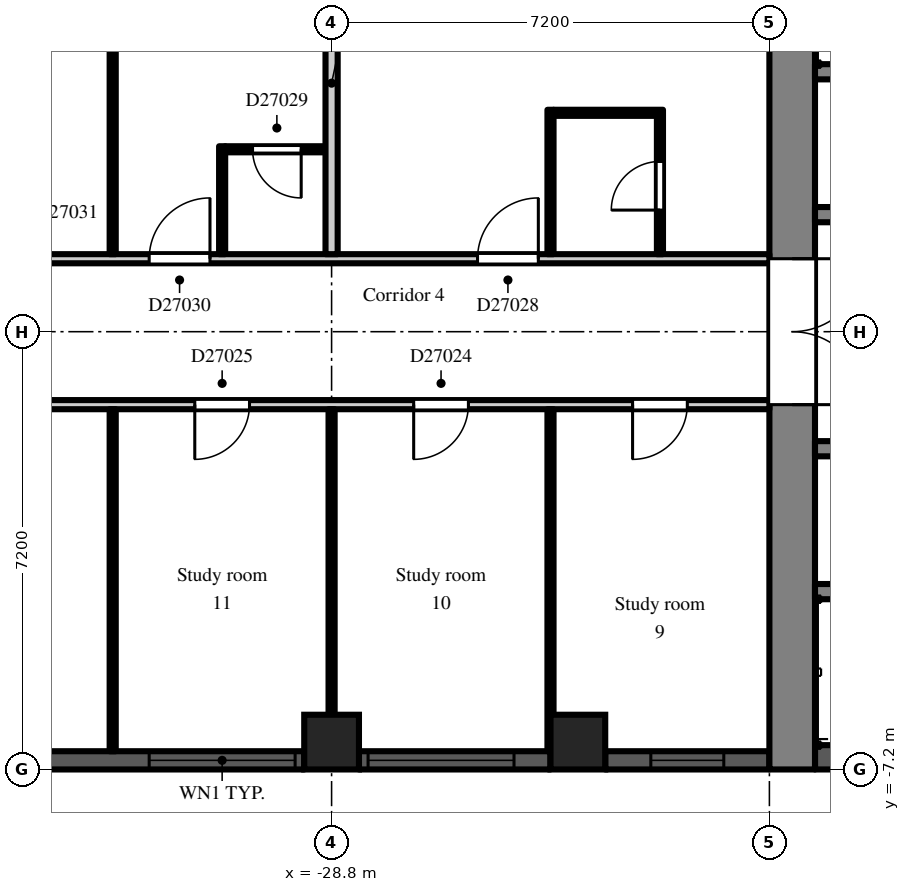
"""IFC4 building model, lengths in metres.
Left out: names, types, materials, properties, quantities, classifications, styles, units other than length and angle.
Written with IfcOpenShell. Run it as: python <this file> out.ifc"""

import sys

from ifc_helpers import new_model, si_unit, direction, frame, frame_2d, origin, origin_2d, place, context, subcontext, project, spatial, rectangle, extrude, element, fill, save


model = new_model("IFC4")
c1 = context("Model", 3, precision=1e-05, world=origin(), true_north=direction((0.0, 1.0)))
c2 = subcontext(c1, "Body", "Model", "MODEL_VIEW")
j1 = project(units=[si_unit("LENGTHUNIT", "METRE"), si_unit("PLANEANGLEUNIT", "RADIAN")], contexts=[c1])
p1 = place(None, origin())
s1 = spatial("IfcSite", under=j1, at=p1, CompositionType="ELEMENT")
p2 = place(p1, origin())
s2 = spatial("IfcBuilding", under=s1, at=p2, CompositionType="ELEMENT")
p3 = place(p2, frame((0.0, 0.0, 188.7)))
s3 = spatial("IfcBuildingStorey", under=s2, at=p3, CompositionType="ELEMENT", Elevation=188.7)
for number, where, z_axis, x_axis in (
    (1, (-28.8, -6.75, 0.0), (0.0, 0.0, 1.0), (1.0, 0.0, 0.0)),
    (2, (-24.75, -6.75, 0.0), (0.0, 0.0, 1.0), (1.0, 0.0, 0.0)),
):
    element("IfcColumn", number, at=place(p3, frame(where, z_axis=z_axis, x_axis=x_axis)), inside=s3, PredefinedType="COLUMN", context=c2, shape_type="SweptSolid", body=[
        extrude(rectangle(XDim=0.9, YDim=0.9, at=origin_2d()), origin(), (0.0, 0.0, 1.0), 3.0),
    ])
p4 = place(p3, frame((-35.55, -7.05, 0.0), z_axis=(0.0, 0.0, 1.0), x_axis=(1.0, 0.0, 0.0)))
e3 = element("IfcWall", 3, at=p4, inside=s3, PredefinedType="SOLIDWALL", context=c2, shape_type="SweptSolid", body=[
    extrude(rectangle(XDim=6.3, YDim=0.3, at=frame_2d((3.15, 0.0))), origin(), (0.0, 0.0, 1.0), 2.2),
])
p5 = place(p4, frame((3.75, 0.0, 0.2)))
e4 = element("IfcOpeningElement", 4, at=p5, cuts=e3, PredefinedType="OPENING", context=c2, shape_type="SweptSolid", body=[
    extrude(rectangle(XDim=2.4, YDim=1.85, at=frame_2d((1.2, 0.925))), frame((0.0, 0.16, 0.0), z_axis=(0.0, -1.0, 0.0), x_axis=(1.0, 0.0, 0.0)), (0.0, 0.0, 1.0), 0.32),
])
p6 = place(p3, frame((-28.35, -7.05, 0.0), z_axis=(0.0, 0.0, 1.0), x_axis=(1.0, 0.0, 0.0)))
e5 = element("IfcWall", 5, at=p6, inside=s3, PredefinedType="SOLIDWALL", context=c2, shape_type="SweptSolid", body=[
    extrude(rectangle(XDim=3.15, YDim=0.3, at=frame_2d((1.575, 0.0))), origin(), (0.0, 0.0, 1.0), 2.2),
])
p7 = place(p6, frame((0.15, 0.0, 0.2)))
e6 = element("IfcOpeningElement", 6, at=p7, cuts=e5, PredefinedType="OPENING", context=c2, shape_type="SweptSolid", body=[
    extrude(rectangle(XDim=2.4, YDim=1.85, at=frame_2d((1.2, 0.925))), frame((0.0, 0.16, 0.0), z_axis=(0.0, -1.0, 0.0), x_axis=(1.0, 0.0, 0.0)), (0.0, 0.0, 1.0), 0.32),
])
p8 = place(p3, frame((-24.3, -7.05, 0.0), z_axis=(0.0, 0.0, 1.0), x_axis=(1.0, 0.0, 0.0)))
e7 = element("IfcWall", 7, at=p8, inside=s3, PredefinedType="SOLIDWALL", context=c2, shape_type="SweptSolid", body=[
    extrude(rectangle(XDim=2.7, YDim=0.3, at=frame_2d((1.35, 0.0))), origin(), (0.0, 0.0, 1.0), 2.2),
])
p9 = place(p8, frame((0.75, 0.0, 0.2)))
e8 = element("IfcOpeningElement", 8, at=p9, cuts=e7, PredefinedType="OPENING", context=c2, shape_type="SweptSolid", body=[
    extrude(rectangle(XDim=1.2, YDim=1.85, at=frame_2d((0.6, 0.925))), frame((0.0, 0.16, 0.0), z_axis=(0.0, -1.0, 0.0), x_axis=(1.0, 0.0, 0.0)), (0.0, 0.0, 1.0), 0.32),
])
p10 = place(p3, frame((-21.225, -7.2, 0.0), z_axis=(0.0, 0.0, 1.0), x_axis=(0.0, 1.0, 0.0)))
e9 = element("IfcWall", 9, at=p10, inside=s3, PredefinedType="SHEAR", context=c2, shape_type="SweptSolid", body=[
    extrude(rectangle(XDim=14.4, YDim=0.75, at=frame_2d((7.2, 0.0))), origin(), (0.0, 0.0, 1.0), 2.6),
])
p11 = place(p10, frame((6.0, 0.0, 0.0)))
e10 = element("IfcOpeningElement", 10, at=p11, cuts=e9, PredefinedType="OPENING", context=c2, shape_type="SweptSolid", body=[
    extrude(rectangle(XDim=2.4, YDim=2.2, at=frame_2d((1.2, 1.1))), frame((0.0, 0.385, 0.0), z_axis=(0.0, -1.0, 0.0), x_axis=(1.0, 0.0, 0.0)), (0.0, 0.0, 1.0), 0.77),
])
p12 = place(p3, frame((-7.9, 1.925, 0.0), z_axis=(0.0, 0.0, 1.0), x_axis=(-1.0, 0.0, 0.0)))
e11 = element("IfcWall", 11, at=p12, inside=s3, PredefinedType="SHEAR", context=c2, shape_type="SweptSolid", body=[
    extrude(rectangle(XDim=12.95, YDim=0.25, at=frame_2d((6.475, 0.0))), origin(), (0.0, 0.0, 1.0), 2.6),
])
p13 = place(p12, frame((4.825, 0.0, 0.0)))
e12 = element("IfcOpeningElement", 12, at=p13, cuts=e11, PredefinedType="OPENING", context=c2, shape_type="SweptSolid", body=[
    extrude(rectangle(XDim=1.1, YDim=2.1, at=frame_2d((0.55, 1.05))), frame((0.0, 0.135, 0.0), z_axis=(0.0, -1.0, 0.0), x_axis=(1.0, 0.0, 0.0)), (0.0, 0.0, 1.0), 0.27),
])
p14 = place(p12, frame((7.025, 0.0, 0.0)))
e13 = element("IfcOpeningElement", 13, at=p14, cuts=e11, PredefinedType="OPENING", context=c2, shape_type="SweptSolid", body=[
    extrude(rectangle(XDim=1.1, YDim=2.1, at=frame_2d((0.55, 1.05))), frame((0.0, 0.135, 0.0), z_axis=(0.0, -1.0, 0.0), x_axis=(1.0, 0.0, 0.0)), (0.0, 0.0, 1.0), 0.27),
])
p15 = place(p12, frame((9.225, 0.0, 0.0)))
e14 = element("IfcOpeningElement", 14, at=p15, cuts=e11, PredefinedType="OPENING", context=c2, shape_type="SweptSolid", body=[
    extrude(rectangle(XDim=1.1, YDim=2.1, at=frame_2d((0.55, 1.05))), frame((0.0, 0.135, 0.0), z_axis=(0.0, -1.0, 0.0), x_axis=(1.0, 0.0, 0.0)), (0.0, 0.0, 1.0), 0.27),
])
p16 = place(p12, frame((0.525, 0.0, 0.0)))
e15 = element("IfcOpeningElement", 15, at=p16, cuts=e11, PredefinedType="OPENING", context=c2, shape_type="SweptSolid", body=[
    extrude(rectangle(XDim=0.9, YDim=2.1, at=frame_2d((0.45, 1.05))), frame((0.0, 0.135, 0.0), z_axis=(0.0, -1.0, 0.0), x_axis=(1.0, 0.0, 0.0)), (0.0, 0.0, 1.0), 0.27),
])
p17 = place(p12, frame((2.625, 0.0, 0.0)))
e16 = element("IfcOpeningElement", 16, at=p17, cuts=e11, PredefinedType="OPENING", context=c2, shape_type="SweptSolid", body=[
    extrude(rectangle(XDim=1.1, YDim=2.1, at=frame_2d((0.55, 1.05))), frame((0.0, 0.135, 0.0), z_axis=(0.0, -1.0, 0.0), x_axis=(1.0, 0.0, 0.0)), (0.0, 0.0, 1.0), 0.27),
])
p18 = place(p12, frame((11.525, 0.0, 0.0)))
e17 = element("IfcOpeningElement", 17, at=p18, cuts=e11, PredefinedType="OPENING", context=c2, shape_type="SweptSolid", body=[
    extrude(rectangle(XDim=0.9, YDim=2.1, at=frame_2d((0.45, 1.05))), frame((0.0, 0.135, 0.0), z_axis=(0.0, -1.0, 0.0), x_axis=(1.0, 0.0, 0.0)), (0.0, 0.0, 1.0), 0.27),
])
p19 = place(p3, frame((-12.3, 4.275, 0.0), z_axis=(0.0, 0.0, 1.0), x_axis=(-1.0, 0.0, 0.0)))
e18 = element("IfcWall", 18, at=p19, inside=s3, PredefinedType="SHEAR", context=c2, shape_type="SweptSolid", body=[
    extrude(rectangle(XDim=8.55, YDim=0.25, at=frame_2d((4.275, 0.0))), origin(), (0.0, 0.0, 1.0), 2.6),
])
p20 = place(p3, frame((-7.9, -7.0, 0.0), z_axis=(0.0, 0.0, 1.0), x_axis=(-1.0, 0.0, 0.0)))
e19 = element("IfcWall", 19, at=p20, inside=s3, PredefinedType="SHEAR", context=c2, shape_type="SweptSolid", body=[
    extrude(rectangle(XDim=12.95, YDim=0.4, at=frame_2d((6.475, 0.0))), origin(), (0.0, 0.0, 1.0), 2.6),
])
p21 = place(p3, frame((-7.9, -1.925, 0.0), z_axis=(0.0, 0.0, 1.0), x_axis=(-1.0, 0.0, 0.0)))
e20 = element("IfcWall", 20, at=p21, inside=s3, PredefinedType="SHEAR", context=c2, shape_type="SweptSolid", body=[
    extrude(rectangle(XDim=12.95, YDim=0.25, at=frame_2d((6.475, 0.0))), origin(), (0.0, 0.0, 1.0), 2.6),
])
p22 = place(p21, frame((0.525, 0.0, 0.0)))
e21 = element("IfcOpeningElement", 21, at=p22, cuts=e20, PredefinedType="OPENING", context=c2, shape_type="SweptSolid", body=[
    extrude(rectangle(XDim=0.9, YDim=2.1, at=frame_2d((0.45, 1.05))), frame((0.0, 0.135, 0.0), z_axis=(0.0, -1.0, 0.0), x_axis=(1.0, 0.0, 0.0)), (0.0, 0.0, 1.0), 0.27),
])
p23 = place(p21, frame((2.625, 0.0, 0.0)))
e22 = element("IfcOpeningElement", 22, at=p23, cuts=e20, PredefinedType="OPENING", context=c2, shape_type="SweptSolid", body=[
    extrude(rectangle(XDim=1.1, YDim=2.1, at=frame_2d((0.55, 1.05))), frame((0.0, 0.135, 0.0), z_axis=(0.0, -1.0, 0.0), x_axis=(1.0, 0.0, 0.0)), (0.0, 0.0, 1.0), 0.27),
])
p24 = place(p21, frame((8.225, 0.0, 0.0)))
e23 = element("IfcOpeningElement", 23, at=p24, cuts=e20, PredefinedType="OPENING", context=c2, shape_type="SweptSolid", body=[
    extrude(rectangle(XDim=0.9, YDim=2.1, at=frame_2d((0.45, 1.05))), frame((0.0, 0.135, 0.0), z_axis=(0.0, -1.0, 0.0), x_axis=(1.0, 0.0, 0.0)), (0.0, 0.0, 1.0), 0.27),
])
p25 = place(p3, frame((-12.3, -4.275, 0.0), z_axis=(0.0, 0.0, 1.0), x_axis=(-1.0, 0.0, 0.0)))
e24 = element("IfcWall", 24, at=p25, inside=s3, PredefinedType="SHEAR", context=c2, shape_type="SweptSolid", body=[
    extrude(rectangle(XDim=8.55, YDim=0.25, at=frame_2d((4.275, 0.0))), origin(), (0.0, 0.0, 1.0), 2.6),
])
p26 = place(p3, frame((-36.5, -1.2, 0.0), z_axis=(0.0, 0.0, 1.0), x_axis=(1.0, 0.0, 0.0)))
e25 = element("IfcWall", 25, at=p26, inside=s3, PredefinedType="PARTITIONING", context=c2, shape_type="SweptSolid", body=[
    extrude(rectangle(XDim=14.9, YDim=0.15, at=frame_2d((7.45, 0.0))), origin(), (0.0, 0.0, 1.0), 2.6),
])
p27 = place(p26, frame((12.65, 0.0, 0.0)))
e26 = element("IfcOpeningElement", 26, at=p27, cuts=e25, PredefinedType="OPENING", context=c2, shape_type="SweptSolid", body=[
    extrude(rectangle(XDim=0.9, YDim=2.1, at=frame_2d((0.45, 1.05))), frame((0.0, 0.085, 0.0), z_axis=(0.0, -1.0, 0.0), x_axis=(1.0, 0.0, 0.0)), (0.0, 0.0, 1.0), 0.17),
])
p28 = place(p26, frame((9.05, 0.0, 0.0)))
e27 = element("IfcOpeningElement", 27, at=p28, cuts=e25, PredefinedType="OPENING", context=c2, shape_type="SweptSolid", body=[
    extrude(rectangle(XDim=0.9, YDim=2.1, at=frame_2d((0.45, 1.05))), frame((0.0, 0.085, 0.0), z_axis=(0.0, -1.0, 0.0), x_axis=(1.0, 0.0, 0.0)), (0.0, 0.0, 1.0), 0.17),
])
p29 = place(p26, frame((5.45, 0.0, 0.0)))
e28 = element("IfcOpeningElement", 28, at=p29, cuts=e25, PredefinedType="OPENING", context=c2, shape_type="SweptSolid", body=[
    extrude(rectangle(XDim=0.9, YDim=2.1, at=frame_2d((0.45, 1.05))), frame((0.0, 0.085, 0.0), z_axis=(0.0, -1.0, 0.0), x_axis=(1.0, 0.0, 0.0)), (0.0, 0.0, 1.0), 0.17),
])
p30 = place(p26, frame((1.15, 0.0, 0.0)))
e29 = element("IfcOpeningElement", 29, at=p30, cuts=e25, PredefinedType="OPENING", context=c2, shape_type="SweptSolid", body=[
    extrude(rectangle(XDim=1.8, YDim=2.1, at=frame_2d((0.9, 1.05))), frame((0.0, 0.085, 0.0), z_axis=(0.0, -1.0, 0.0), x_axis=(1.0, 0.0, 0.0)), (0.0, 0.0, 1.0), 0.17),
])
p31 = place(p3, frame((-36.5, 1.2, 0.0), z_axis=(0.0, 0.0, 1.0), x_axis=(1.0, 0.0, 0.0)))
e30 = element("IfcWall", 30, at=p31, inside=s3, PredefinedType="PARTITIONING", context=c2, shape_type="SweptSolid", body=[
    extrude(rectangle(XDim=14.9, YDim=0.15, at=frame_2d((7.45, 0.0))), origin(), (0.0, 0.0, 1.0), 2.6),
])
p32 = place(p31, frame((10.1, 0.0, 0.0)))
e31 = element("IfcOpeningElement", 31, at=p32, cuts=e30, PredefinedType="OPENING", context=c2, shape_type="SweptSolid", body=[
    extrude(rectangle(XDim=1.0, YDim=2.1, at=frame_2d((0.5, 1.05))), frame((0.0, 0.085, 0.0), z_axis=(0.0, -1.0, 0.0), x_axis=(1.0, 0.0, 0.0)), (0.0, 0.0, 1.0), 0.17),
])
p33 = place(p31, frame((4.7, 0.0, 0.0)))
e32 = element("IfcOpeningElement", 32, at=p33, cuts=e30, PredefinedType="OPENING", context=c2, shape_type="SweptSolid", body=[
    extrude(rectangle(XDim=1.0, YDim=2.1, at=frame_2d((0.5, 1.05))), frame((0.0, 0.085, 0.0), z_axis=(0.0, -1.0, 0.0), x_axis=(1.0, 0.0, 0.0)), (0.0, 0.0, 1.0), 0.17),
])
p34 = place(p31, frame((1.15, 0.0, 0.0)))
e33 = element("IfcOpeningElement", 33, at=p34, cuts=e30, PredefinedType="OPENING", context=c2, shape_type="SweptSolid", body=[
    extrude(rectangle(XDim=1.8, YDim=2.1, at=frame_2d((0.9, 1.05))), frame((0.0, 0.085, 0.0), z_axis=(0.0, -1.0, 0.0), x_axis=(1.0, 0.0, 0.0)), (0.0, 0.0, 1.0), 0.17),
])
for number, where, z_axis, x_axis in (
    (34, (-32.4, -6.9, 0.0), (0.0, 0.0, 1.0), (0.0, 1.0, 0.0)),
    (35, (-32.4, 1.275, 0.0), (0.0, 0.0, 1.0), (0.0, 1.0, 0.0)),
):
    element("IfcWall", number, at=place(p3, frame(where, z_axis=z_axis, x_axis=x_axis)), inside=s3, PredefinedType="PARTITIONING", context=c2, shape_type="SweptSolid", body=[
        extrude(rectangle(XDim=5.625, YDim=0.1, at=frame_2d((2.812, 0.0))), origin(), (0.0, 0.0, 1.0), 2.6),
    ])
p35 = place(p3, frame((-30.6, 1.275, 0.0), z_axis=(0.0, 0.0, 1.0), x_axis=(0.0, 1.0, 0.0)))
e36 = element("IfcWall", 36, at=p35, inside=s3, PredefinedType="PARTITIONING", context=c2, shape_type="SweptSolid", body=[
    extrude(rectangle(XDim=1.775, YDim=0.1, at=frame_2d((0.888, 0.0))), origin(), (0.0, 0.0, 1.0), 2.6),
])
p36 = place(p3, frame((-30.55, 3.0, 0.0), z_axis=(0.0, 0.0, 1.0), x_axis=(1.0, 0.0, 0.0)))
e37 = element("IfcWall", 37, at=p36, inside=s3, PredefinedType="PARTITIONING", context=c2, shape_type="SweptSolid", body=[
    extrude(rectangle(XDim=1.65, YDim=0.1, at=frame_2d((0.825, 0.0))), origin(), (0.0, 0.0, 1.0), 2.6),
])
p37 = place(p36, frame((0.45, 0.0, 0.0)))
e38 = element("IfcOpeningElement", 38, at=p37, cuts=e37, PredefinedType="OPENING", context=c2, shape_type="SweptSolid", body=[
    extrude(rectangle(XDim=0.8, YDim=2.1, at=frame_2d((0.4, 1.05))), frame((0.0, 0.06, 0.0), z_axis=(0.0, -1.0, 0.0), x_axis=(1.0, 0.0, 0.0)), (0.0, 0.0, 1.0), 0.12),
])
p38 = place(p3, frame((-28.8, -6.9, 0.0), z_axis=(0.0, 0.0, 1.0), x_axis=(0.0, 1.0, 0.0)))
e39 = element("IfcWall", 39, at=p38, inside=s3, PredefinedType="PARTITIONING", context=c2, shape_type="SweptSolid", body=[
    extrude(rectangle(XDim=5.625, YDim=0.1, at=frame_2d((2.812, 0.0))), origin(), (0.0, 0.0, 1.0), 2.6),
])
p39 = place(p3, frame((-28.8, 1.275, 0.0), z_axis=(0.0, 0.0, 1.0), x_axis=(0.0, 1.0, 0.0)))
e40 = element("IfcWall", 40, at=p39, inside=s3, PredefinedType="PARTITIONING", context=c2, shape_type="SweptSolid", body=[
    extrude(rectangle(XDim=5.625, YDim=0.2, at=frame_2d((2.812, 0.0))), origin(), (0.0, 0.0, 1.0), 2.6),
])
p40 = place(p3, frame((-25.2, -6.9, 0.0), z_axis=(0.0, 0.0, 1.0), x_axis=(0.0, 1.0, 0.0)))
e41 = element("IfcWall", 41, at=p40, inside=s3, PredefinedType="PARTITIONING", context=c2, shape_type="SweptSolid", body=[
    extrude(rectangle(XDim=5.625, YDim=0.1, at=frame_2d((2.812, 0.0))), origin(), (0.0, 0.0, 1.0), 2.6),
])
p41 = place(p3, frame((-25.2, 1.275, 0.0), z_axis=(0.0, 0.0, 1.0), x_axis=(0.0, 1.0, 0.0)))
e42 = element("IfcWall", 42, at=p41, inside=s3, PredefinedType="PARTITIONING", context=c2, shape_type="SweptSolid", body=[
    extrude(rectangle(XDim=2.375, YDim=0.1, at=frame_2d((1.188, 0.0))), origin(), (0.0, 0.0, 1.0), 2.6),
])
p42 = place(p3, frame((-25.15, 3.6, 0.0), z_axis=(0.0, 0.0, 1.0), x_axis=(1.0, 0.0, 0.0)))
e43 = element("IfcWall", 43, at=p42, inside=s3, PredefinedType="PARTITIONING", context=c2, shape_type="SweptSolid", body=[
    extrude(rectangle(XDim=1.8, YDim=0.1, at=frame_2d((0.9, 0.0))), origin(), (0.0, 0.0, 1.0), 2.6),
])
p43 = place(p3, frame((-23.4, 1.275, 0.0), z_axis=(0.0, 0.0, 1.0), x_axis=(0.0, 1.0, 0.0)))
e44 = element("IfcWall", 44, at=p43, inside=s3, PredefinedType="PARTITIONING", context=c2, shape_type="SweptSolid", body=[
    extrude(rectangle(XDim=2.275, YDim=0.1, at=frame_2d((1.138, 0.0))), origin(), (0.0, 0.0, 1.0), 2.6),
])
p44 = place(p43, frame((0.725, 0.0, 0.0)))
e45 = element("IfcOpeningElement", 45, at=p44, cuts=e44, PredefinedType="OPENING", context=c2, shape_type="SweptSolid", body=[
    extrude(rectangle(XDim=0.8, YDim=2.1, at=frame_2d((0.4, 1.05))), frame((0.0, 0.06, 0.0), z_axis=(0.0, -1.0, 0.0), x_axis=(1.0, 0.0, 0.0)), (0.0, 0.0, 1.0), 0.12),
])
p45 = place(p5, origin())
e46 = element("IfcWindow", 46, at=p45, inside=s3, PartitioningType="SINGLE_PANEL", PredefinedType="WINDOW", context=c2, shape_type="SweptSolid", body=[
    extrude(rectangle(XDim=2.4, YDim=1.85, at=frame_2d((1.2, 0.925))), frame((0.0, 0.03, 0.0), z_axis=(0.0, -1.0, 0.0), x_axis=(1.0, 0.0, 0.0)), (0.0, 0.0, 1.0), 0.06),
])
fill(e4, e46)
p46 = place(p7, origin())
e47 = element("IfcWindow", 47, at=p46, inside=s3, PartitioningType="SINGLE_PANEL", PredefinedType="WINDOW", context=c2, shape_type="SweptSolid", body=[
    extrude(rectangle(XDim=2.4, YDim=1.85, at=frame_2d((1.2, 0.925))), frame((0.0, 0.03, 0.0), z_axis=(0.0, -1.0, 0.0), x_axis=(1.0, 0.0, 0.0)), (0.0, 0.0, 1.0), 0.06),
])
fill(e6, e47)
p47 = place(p9, origin())
e48 = element("IfcWindow", 48, at=p47, inside=s3, PartitioningType="SINGLE_PANEL", PredefinedType="WINDOW", context=c2, shape_type="SweptSolid", body=[
    extrude(rectangle(XDim=1.2, YDim=1.85, at=frame_2d((0.6, 0.925))), frame((0.0, 0.03, 0.0), z_axis=(0.0, -1.0, 0.0), x_axis=(1.0, 0.0, 0.0)), (0.0, 0.0, 1.0), 0.06),
])
fill(e8, e48)
p48 = place(p11, frame((2.4, 0.0, 0.0), z_axis=(0.0, 0.0, 1.0), x_axis=(-1.0, 0.0, 0.0)))
e49 = element("IfcDoor", 49, at=p48, inside=s3, OperationType="DOUBLE_DOOR_DOUBLE_SWING", PredefinedType="DOOR", context=c2, shape_type="SweptSolid", body=[
    extrude(rectangle(XDim=2.4, YDim=2.2, at=frame_2d((1.2, 1.1))), frame((0.0, 0.025, 0.0), z_axis=(0.0, -1.0, 0.0), x_axis=(1.0, 0.0, 0.0)), (0.0, 0.0, 1.0), 0.05),
])
fill(e10, e49)
p49 = place(p27, frame((0.9, 0.0, 0.0), z_axis=(0.0, 0.0, 1.0), x_axis=(-1.0, 0.0, 0.0)))
e50 = element("IfcDoor", 50, at=p49, inside=s3, OperationType="SINGLE_SWING_RIGHT", PredefinedType="DOOR", context=c2, shape_type="SweptSolid", body=[
    extrude(rectangle(XDim=0.9, YDim=2.1, at=frame_2d((0.45, 1.05))), frame((0.0, 0.025, 0.0), z_axis=(0.0, -1.0, 0.0), x_axis=(1.0, 0.0, 0.0)), (0.0, 0.0, 1.0), 0.05),
])
fill(e26, e50)
p50 = place(p28, frame((0.9, 0.0, 0.0), z_axis=(0.0, 0.0, 1.0), x_axis=(-1.0, 0.0, 0.0)))
e51 = element("IfcDoor", 51, at=p50, inside=s3, OperationType="SINGLE_SWING_RIGHT", PredefinedType="DOOR", context=c2, shape_type="SweptSolid", body=[
    extrude(rectangle(XDim=0.9, YDim=2.1, at=frame_2d((0.45, 1.05))), frame((0.0, 0.025, 0.0), z_axis=(0.0, -1.0, 0.0), x_axis=(1.0, 0.0, 0.0)), (0.0, 0.0, 1.0), 0.05),
])
fill(e27, e51)
p51 = place(p29, frame((0.9, 0.0, 0.0), z_axis=(0.0, 0.0, 1.0), x_axis=(-1.0, 0.0, 0.0)))
e52 = element("IfcDoor", 52, at=p51, inside=s3, OperationType="SINGLE_SWING_RIGHT", PredefinedType="DOOR", context=c2, shape_type="SweptSolid", body=[
    extrude(rectangle(XDim=0.9, YDim=2.1, at=frame_2d((0.45, 1.05))), frame((0.0, 0.025, 0.0), z_axis=(0.0, -1.0, 0.0), x_axis=(1.0, 0.0, 0.0)), (0.0, 0.0, 1.0), 0.05),
])
fill(e28, e52)
p52 = place(p44, origin())
e53 = element("IfcDoor", 53, at=p52, inside=s3, OperationType="SINGLE_SWING_LEFT", PredefinedType="DOOR", context=c2, shape_type="SweptSolid", body=[
    extrude(rectangle(XDim=0.8, YDim=2.1, at=frame_2d((0.4, 1.05))), frame((0.0, 0.025, 0.0), z_axis=(0.0, -1.0, 0.0), x_axis=(1.0, 0.0, 0.0)), (0.0, 0.0, 1.0), 0.05),
])
fill(e45, e53)
p53 = place(p32, origin())
e54 = element("IfcDoor", 54, at=p53, inside=s3, OperationType="SINGLE_SWING_RIGHT", PredefinedType="DOOR", context=c2, shape_type="SweptSolid", body=[
    extrude(rectangle(XDim=1.0, YDim=2.1, at=frame_2d((0.5, 1.05))), frame((0.0, 0.025, 0.0), z_axis=(0.0, -1.0, 0.0), x_axis=(1.0, 0.0, 0.0)), (0.0, 0.0, 1.0), 0.05),
])
fill(e31, e54)
p54 = place(p37, frame((0.8, 0.0, 0.0), z_axis=(0.0, 0.0, 1.0), x_axis=(-1.0, 0.0, 0.0)))
e55 = element("IfcDoor", 55, at=p54, inside=s3, OperationType="SINGLE_SWING_LEFT", PredefinedType="DOOR", context=c2, shape_type="SweptSolid", body=[
    extrude(rectangle(XDim=0.8, YDim=2.1, at=frame_2d((0.4, 1.05))), frame((0.0, 0.025, 0.0), z_axis=(0.0, -1.0, 0.0), x_axis=(1.0, 0.0, 0.0)), (0.0, 0.0, 1.0), 0.05),
])
fill(e38, e55)
p55 = place(p33, origin())
e56 = element("IfcDoor", 56, at=p55, inside=s3, OperationType="SINGLE_SWING_RIGHT", PredefinedType="DOOR", context=c2, shape_type="SweptSolid", body=[
    extrude(rectangle(XDim=1.0, YDim=2.1, at=frame_2d((0.5, 1.05))), frame((0.0, 0.025, 0.0), z_axis=(0.0, -1.0, 0.0), x_axis=(1.0, 0.0, 0.0)), (0.0, 0.0, 1.0), 0.05),
])
fill(e32, e56)
save(model, sys.argv[1])
